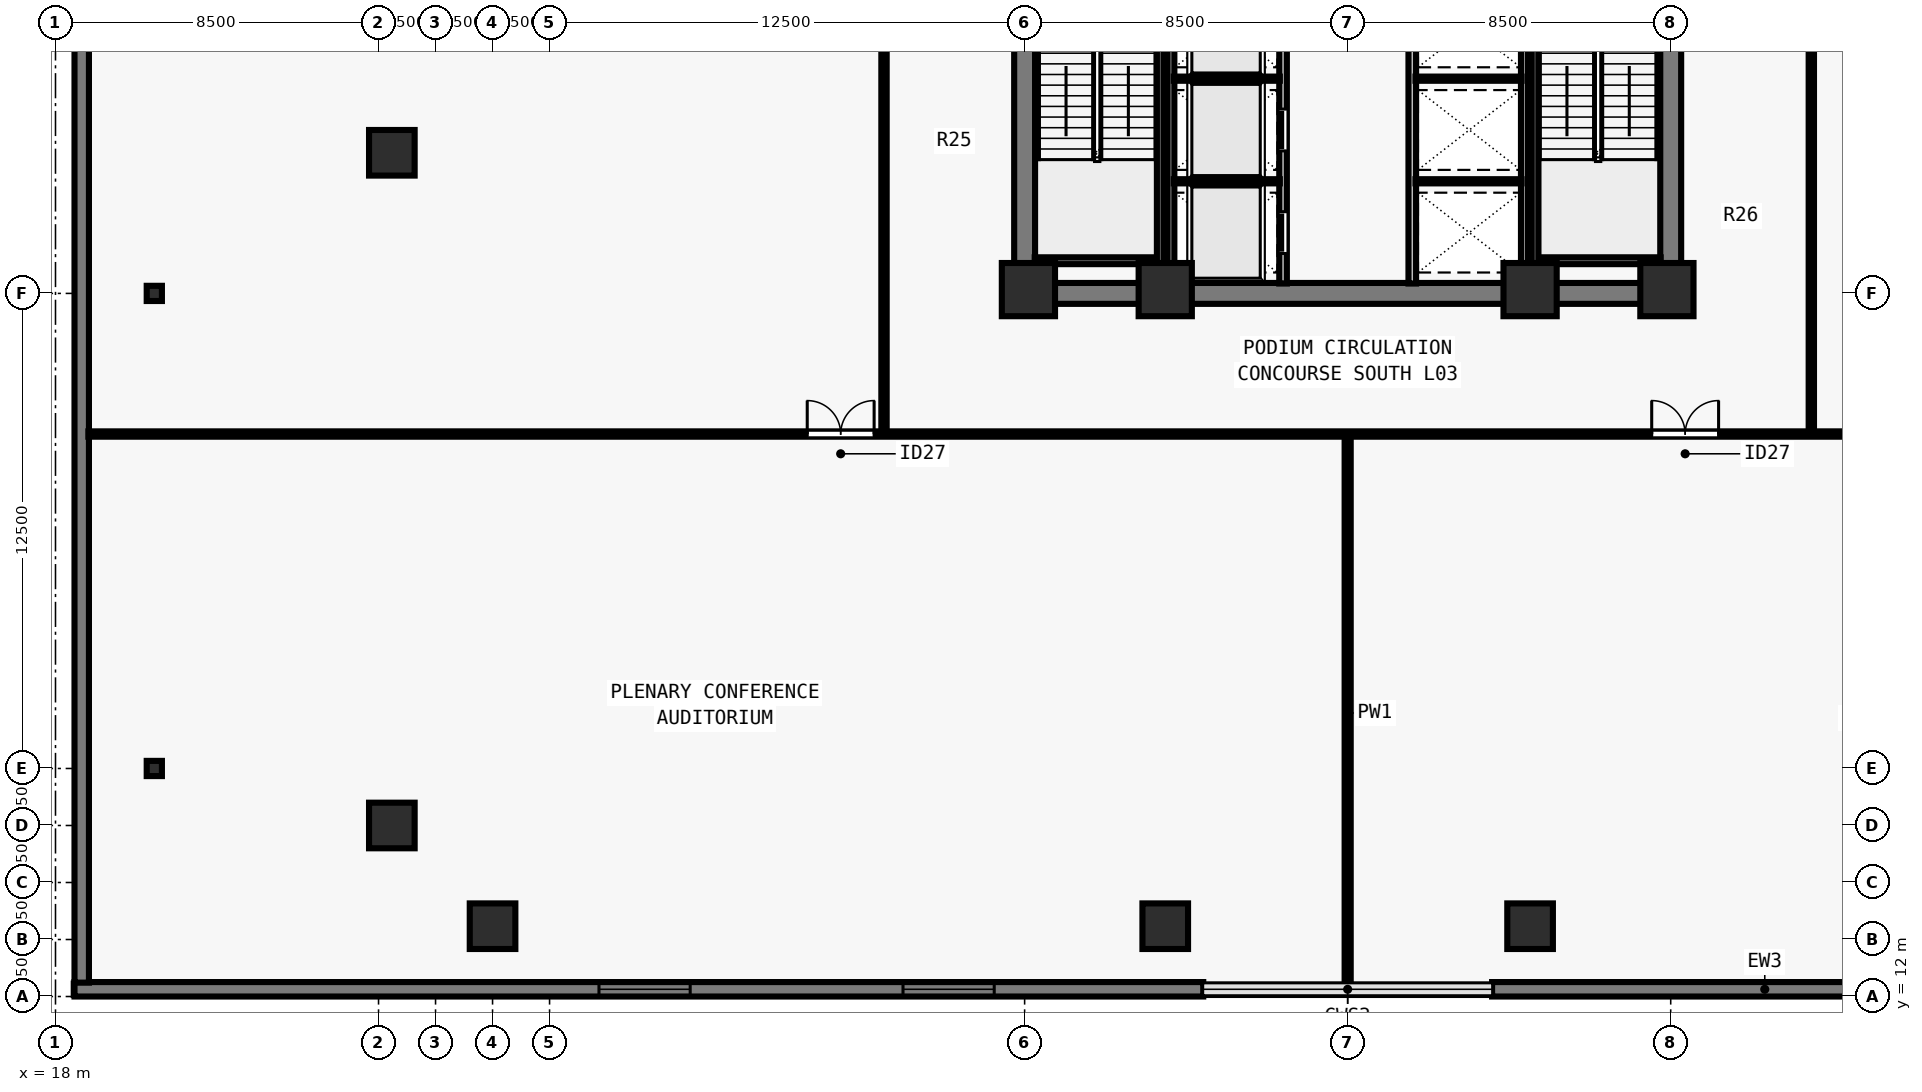
"""IFC4 building model, lengths in metres.
Left out: names, types, materials, properties, quantities, classifications, styles, units other than length and angle.
Written with IfcOpenShell. Run it as: python <this file> out.ifc"""

import sys

from ifc_helpers import new_model, si_unit, direction, frame, frame_2d, origin, origin_2d, place, context, subcontext, project, spatial, rectangle, i_section, extrude, element, fill, save


model = new_model("IFC4")
c1 = context("Model", 3, precision=1e-05, world=origin(), true_north=direction((0.0, 1.0)))
c2 = subcontext(c1, "Body", "Model", "MODEL_VIEW")
j1 = project(units=[si_unit("LENGTHUNIT", "METRE"), si_unit("PLANEANGLEUNIT", "RADIAN")], contexts=[c1])
p1 = place(None, origin())
s1 = spatial("IfcSite", under=j1, at=p1, CompositionType="ELEMENT")
p2 = place(p1, origin())
s2 = spatial("IfcBuilding", under=s1, at=p2, CompositionType="ELEMENT")
p3 = place(p2, frame((0.0, 0.0, 14.5)))
s3 = spatial("IfcBuildingStorey", under=s2, at=p3, CompositionType="ELEMENT", Elevation=14.5)
for number, where, z_axis, x_axis in (
    (1, (43.6, 30.6, 0.0), (0.0, 0.0, 1.0), (1.0, 0.0, 0.0)),
    (2, (47.2, 30.6, 0.0), (0.0, 0.0, 1.0), (1.0, 0.0, 0.0)),
    (3, (56.8, 30.6, 0.0), (0.0, 0.0, 1.0), (1.0, 0.0, 0.0)),
    (4, (60.4, 30.6, 0.0), (0.0, 0.0, 1.0), (1.0, 0.0, 0.0)),
):
    element("IfcColumn", number, at=place(p3, frame(where, z_axis=z_axis, x_axis=x_axis)), inside=s3, PredefinedType="COLUMN", context=c2, shape_type="SweptSolid", body=[
        extrude(rectangle(XDim=1.4, YDim=1.4, at=origin_2d()), origin(), (0.0, 0.0, 1.0), 4.5),
    ])
for number, where, z_axis, x_axis in (
    (5, (29.5, 13.85, 0.0), (0.0, 0.0, 1.0), (1.0, 0.0, 0.0)),
    (6, (47.2, 13.85, 0.0), (0.0, 0.0, 1.0), (1.0, 0.0, 0.0)),
    (7, (56.8, 13.85, 0.0), (0.0, 0.0, 1.0), (1.0, 0.0, 0.0)),
    (8, (26.85, 34.2, 0.0), (0.0, 0.0, 1.0), (1.0, 0.0, 0.0)),
    (9, (26.85, 16.5, 0.0), (0.0, 0.0, 1.0), (1.0, 0.0, 0.0)),
):
    element("IfcColumn", number, at=place(p3, frame(where, z_axis=z_axis, x_axis=x_axis)), inside=s3, PredefinedType="COLUMN", context=c2, shape_type="SweptSolid", body=[
        extrude(rectangle(XDim=1.2, YDim=1.2, at=origin_2d()), origin(), (0.0, 0.0, 1.0), 4.5),
    ])
for number, where, z_axis, x_axis in (
    (10, (20.6, 18.0, 0.0), (0.0, 0.0, 1.0), (1.0, 0.0, 0.0)),
    (11, (20.6, 30.5, 0.0), (0.0, 0.0, 1.0), (1.0, 0.0, 0.0)),
):
    element("IfcColumn", number, at=place(p3, frame(where, z_axis=z_axis, x_axis=x_axis)), inside=s3, PredefinedType="COLUMN", context=c2, shape_type="SweptSolid", body=[
        extrude(i_section(OverallWidth=0.4, OverallDepth=0.4, WebThickness=0.028, FlangeThickness=0.045, at=origin_2d()), origin(), (0.0, 0.0, 1.0), 4.5),
    ])
p4 = place(p3, frame((85.5, 12.19, 0.0), z_axis=(0.0, 0.0, 1.0), x_axis=(-1.0, 0.0, 0.0)))
e12 = element("IfcWall", 12, at=p4, inside=s3, PredefinedType="SOLIDWALL", context=c2, shape_type="SweptSolid", body=[
    extrude(rectangle(XDim=29.7, YDim=0.38, at=frame_2d((14.85, 0.0))), origin(), (0.0, 0.0, 1.0), 4.15),
])
p5 = place(p4, frame((5.5, 0.0, 0.8)))
e13 = element("IfcOpeningElement", 13, at=p5, cuts=e12, PredefinedType="OPENING", context=c2, shape_type="SweptSolid", body=[
    extrude(rectangle(XDim=2.4, YDim=1.6, at=frame_2d((1.2, 0.8))), frame((0.0, 0.2, 0.0), z_axis=(0.0, -1.0, 0.0), x_axis=(1.0, 0.0, 0.0)), (0.0, 0.0, 1.0), 0.4),
])
p6 = place(p4, frame((12.8, 0.0, 0.8)))
e14 = element("IfcOpeningElement", 14, at=p6, cuts=e12, PredefinedType="OPENING", context=c2, shape_type="SweptSolid", body=[
    extrude(rectangle(XDim=2.4, YDim=1.6, at=frame_2d((1.2, 0.8))), frame((0.0, 0.2, 0.0), z_axis=(0.0, -1.0, 0.0), x_axis=(1.0, 0.0, 0.0)), (0.0, 0.0, 1.0), 0.4),
])
p7 = place(p3, frame((48.2, 12.19, 0.0), z_axis=(0.0, 0.0, 1.0), x_axis=(-1.0, 0.0, 0.0)))
e15 = element("IfcWall", 15, at=p7, inside=s3, PredefinedType="SOLIDWALL", context=c2, shape_type="SweptSolid", body=[
    extrude(rectangle(XDim=29.7, YDim=0.38, at=frame_2d((14.85, 0.0))), origin(), (0.0, 0.0, 1.0), 4.15),
])
p8 = place(p7, frame((5.5, 0.0, 0.8)))
e16 = element("IfcOpeningElement", 16, at=p8, cuts=e15, PredefinedType="OPENING", context=c2, shape_type="SweptSolid", body=[
    extrude(rectangle(XDim=2.4, YDim=1.6, at=frame_2d((1.2, 0.8))), frame((0.0, 0.2, 0.0), z_axis=(0.0, -1.0, 0.0), x_axis=(1.0, 0.0, 0.0)), (0.0, 0.0, 1.0), 0.4),
])
p9 = place(p7, frame((13.5, 0.0, 0.8)))
e17 = element("IfcOpeningElement", 17, at=p9, cuts=e15, PredefinedType="OPENING", context=c2, shape_type="SweptSolid", body=[
    extrude(rectangle(XDim=2.4, YDim=1.6, at=frame_2d((1.2, 0.8))), frame((0.0, 0.2, 0.0), z_axis=(0.0, -1.0, 0.0), x_axis=(1.0, 0.0, 0.0)), (0.0, 0.0, 1.0), 0.4),
])
p10 = place(p3, frame((18.69, 12.365, 0.0), z_axis=(0.0, 0.0, 1.0), x_axis=(0.0, 1.0, 0.0)))
e18 = element("IfcWall", 18, at=p10, inside=s3, PredefinedType="SOLIDWALL", context=c2, shape_type="SweptSolid", body=[
    extrude(rectangle(XDim=53.27, YDim=0.38, at=frame_2d((26.635, 0.0))), origin(), (0.0, 0.0, 1.0), 4.15),
])
p11 = place(p3, frame((43.225, 30.5, 0.0), z_axis=(0.0, 0.0, 1.0), x_axis=(1.0, 0.0, 0.0)))
e19 = element("IfcWall", 19, at=p11, inside=s3, PredefinedType="SHEAR", context=c2, shape_type="SweptSolid", body=[
    extrude(rectangle(XDim=17.55, YDim=0.55, at=frame_2d((8.775, 0.0))), origin(), (0.0, 0.0, 1.0), 4.15),
])
for number, where, z_axis, x_axis in (
    (20, (43.5, 30.765, 0.0), (0.0, 0.0, 1.0), (0.0, 1.0, 0.0)),
    (21, (60.5, 30.765, 0.0), (0.0, 0.0, 1.0), (0.0, 1.0, 0.0)),
):
    element("IfcWall", number, at=place(p3, frame(where, z_axis=z_axis, x_axis=x_axis)), inside=s3, PredefinedType="SHEAR", context=c2, shape_type="SweptSolid", body=[
        extrude(rectangle(XDim=7.985, YDim=0.55, at=frame_2d((3.993, 0.0))), origin(), (0.0, 0.0, 1.0), 4.15),
    ])
p12 = place(p3, frame((50.3, 30.76, 0.0), z_axis=(0.0, 0.0, 1.0), x_axis=(0.0, 1.0, 0.0)))
e22 = element("IfcWall", 22, at=p12, inside=s3, PredefinedType="SOLIDWALL", context=c2, shape_type="SweptSolid", body=[
    extrude(rectangle(XDim=7.855, YDim=0.2, at=frame_2d((3.927, 0.0))), origin(), (0.0, 0.0, 1.0), 4.15),
])
p13 = place(p12, frame((0.79, 0.0, 0.0)))
e23 = element("IfcOpeningElement", 23, at=p13, cuts=e22, PredefinedType="OPENING", context=c2, shape_type="SweptSolid", body=[
    extrude(rectangle(XDim=1.1, YDim=2.2, at=frame_2d((0.55, 1.1))), frame((0.0, 0.11, 0.0), z_axis=(0.0, -1.0, 0.0), x_axis=(1.0, 0.0, 0.0)), (0.0, 0.0, 1.0), 0.22),
])
p14 = place(p12, frame((3.49, 0.0, 0.0)))
e24 = element("IfcOpeningElement", 24, at=p14, cuts=e22, PredefinedType="OPENING", context=c2, shape_type="SweptSolid", body=[
    extrude(rectangle(XDim=1.1, YDim=2.2, at=frame_2d((0.55, 1.1))), frame((0.0, 0.11, 0.0), z_axis=(0.0, -1.0, 0.0), x_axis=(1.0, 0.0, 0.0)), (0.0, 0.0, 1.0), 0.22),
])
p15 = place(p12, frame((6.19, 0.0, 0.0)))
e25 = element("IfcOpeningElement", 25, at=p15, cuts=e22, PredefinedType="OPENING", context=c2, shape_type="SweptSolid", body=[
    extrude(rectangle(XDim=1.1, YDim=2.2, at=frame_2d((0.55, 1.1))), frame((0.0, 0.11, 0.0), z_axis=(0.0, -1.0, 0.0), x_axis=(1.0, 0.0, 0.0)), (0.0, 0.0, 1.0), 0.22),
])
p16 = place(p3, frame((53.7, 30.76, 0.0), z_axis=(0.0, 0.0, 1.0), x_axis=(0.0, 1.0, 0.0)))
e26 = element("IfcWall", 26, at=p16, inside=s3, PredefinedType="SOLIDWALL", context=c2, shape_type="SweptSolid", body=[
    extrude(rectangle(XDim=7.855, YDim=0.2, at=frame_2d((3.927, 0.0))), origin(), (0.0, 0.0, 1.0), 4.15),
])
p17 = place(p3, frame((47.35, 30.76, 0.0), z_axis=(0.0, 0.0, 1.0), x_axis=(0.0, 1.0, 0.0)))
e27 = element("IfcWall", 27, at=p17, inside=s3, PredefinedType="SOLIDWALL", context=c2, shape_type="SweptSolid", body=[
    extrude(rectangle(XDim=7.855, YDim=0.18, at=frame_2d((3.927, 0.0))), origin(), (0.0, 0.0, 1.0), 4.15),
])
for number, where, z_axis, x_axis in (
    (28, (47.425, 33.45, 0.0), (0.0, 0.0, 1.0), (1.0, 0.0, 0.0)),
    (29, (47.425, 36.15, 0.0), (0.0, 0.0, 1.0), (1.0, 0.0, 0.0)),
):
    element("IfcWall", number, at=place(p3, frame(where, z_axis=z_axis, x_axis=x_axis)), inside=s3, PredefinedType="PARTITIONING", context=c2, shape_type="SweptSolid", body=[
        extrude(rectangle(XDim=2.79, YDim=0.11, at=frame_2d((1.395, 0.0))), origin(), (0.0, 0.0, 1.0), 4.15),
    ])
p18 = place(p3, frame((56.65, 30.76, 0.0), z_axis=(0.0, 0.0, 1.0), x_axis=(0.0, 1.0, 0.0)))
e30 = element("IfcWall", 30, at=p18, inside=s3, PredefinedType="SOLIDWALL", context=c2, shape_type="SweptSolid", body=[
    extrude(rectangle(XDim=7.855, YDim=0.18, at=frame_2d((3.927, 0.0))), origin(), (0.0, 0.0, 1.0), 4.15),
])
for number, where, z_axis, x_axis in (
    (31, (53.785, 33.45, 0.0), (0.0, 0.0, 1.0), (1.0, 0.0, 0.0)),
    (32, (53.785, 36.15, 0.0), (0.0, 0.0, 1.0), (1.0, 0.0, 0.0)),
):
    element("IfcWall", number, at=place(p3, frame(where, z_axis=z_axis, x_axis=x_axis)), inside=s3, PredefinedType="PARTITIONING", context=c2, shape_type="SweptSolid", body=[
        extrude(rectangle(XDim=2.79, YDim=0.11, at=frame_2d((1.395, 0.0))), origin(), (0.0, 0.0, 1.0), 4.15),
    ])
p19 = place(p3, frame((18.865, 26.8, 0.0), z_axis=(0.0, 0.0, 1.0), x_axis=(1.0, 0.0, 0.0)))
e33 = element("IfcWall", 33, at=p19, inside=s3, PredefinedType="PARTITIONING", context=c2, shape_type="SweptSolid", body=[
    extrude(rectangle(XDim=66.27, YDim=0.14, at=frame_2d((33.135, 0.0))), origin(), (0.0, 0.0, 1.0), 3.668),
])
p20 = place(p19, frame((18.915, 0.0, 0.0)))
e34 = element("IfcOpeningElement", 34, at=p20, cuts=e33, PredefinedType="OPENING", context=c2, shape_type="SweptSolid", body=[
    extrude(rectangle(XDim=1.76, YDim=2.2, at=frame_2d((0.88, 1.1))), frame((0.0, 0.08, 0.0), z_axis=(0.0, -1.0, 0.0), x_axis=(1.0, 0.0, 0.0)), (0.0, 0.0, 1.0), 0.16),
])
p21 = place(p19, frame((41.135, 0.0, 0.0)))
e35 = element("IfcOpeningElement", 35, at=p21, cuts=e33, PredefinedType="OPENING", context=c2, shape_type="SweptSolid", body=[
    extrude(rectangle(XDim=1.76, YDim=2.2, at=frame_2d((0.88, 1.1))), frame((0.0, 0.08, 0.0), z_axis=(0.0, -1.0, 0.0), x_axis=(1.0, 0.0, 0.0)), (0.0, 0.0, 1.0), 0.16),
])
p22 = place(p3, frame((39.8, 26.855, 0.0), z_axis=(0.0, 0.0, 1.0), x_axis=(0.0, 1.0, 0.0)))
e36 = element("IfcWall", 36, at=p22, inside=s3, PredefinedType="PARTITIONING", context=c2, shape_type="SweptSolid", body=[
    extrude(rectangle(XDim=24.29, YDim=0.14, at=frame_2d((12.145, 0.0))), origin(), (0.0, 0.0, 1.0), 4.15),
])
p23 = place(p22, frame((10.945, 0.0, 0.0)))
e37 = element("IfcOpeningElement", 37, at=p23, cuts=e36, PredefinedType="OPENING", context=c2, shape_type="SweptSolid", body=[
    extrude(rectangle(XDim=1.76, YDim=2.2, at=frame_2d((0.88, 1.1))), frame((0.0, 0.08, 0.0), z_axis=(0.0, -1.0, 0.0), x_axis=(1.0, 0.0, 0.0)), (0.0, 0.0, 1.0), 0.16),
])
p24 = place(p3, frame((64.2, 26.855, 0.0), z_axis=(0.0, 0.0, 1.0), x_axis=(0.0, 1.0, 0.0)))
e38 = element("IfcWall", 38, at=p24, inside=s3, PredefinedType="PARTITIONING", context=c2, shape_type="SweptSolid", body=[
    extrude(rectangle(XDim=24.29, YDim=0.14, at=frame_2d((12.145, 0.0))), origin(), (0.0, 0.0, 1.0), 4.15),
])
p25 = place(p24, frame((10.945, 0.0, 0.0)))
e39 = element("IfcOpeningElement", 39, at=p25, cuts=e38, PredefinedType="OPENING", context=c2, shape_type="SweptSolid", body=[
    extrude(rectangle(XDim=1.76, YDim=2.2, at=frame_2d((0.88, 1.1))), frame((0.0, 0.08, 0.0), z_axis=(0.0, -1.0, 0.0), x_axis=(1.0, 0.0, 0.0)), (0.0, 0.0, 1.0), 0.16),
])
p26 = place(p3, frame((52.0, 12.22, 0.0), z_axis=(0.0, 0.0, 1.0), x_axis=(0.0, 1.0, 0.0)))
e40 = element("IfcWall", 40, at=p26, inside=s3, PredefinedType="PARTITIONING", context=c2, shape_type="SweptSolid", body=[
    extrude(rectangle(XDim=14.48, YDim=0.16, at=frame_2d((7.24, 0.0))), origin(), (0.0, 0.0, 1.0), 4.15),
])
p27 = place(p3, frame((43.765, 31.36, 0.0), z_axis=(0.0, 0.0, 1.0), x_axis=(1.0, 0.0, 0.0)))
e41 = element("IfcWall", 41, at=p27, inside=s3, PredefinedType="SOLIDWALL", context=c2, shape_type="SweptSolid", body=[
    extrude(rectangle(XDim=3.23, YDim=0.18, at=frame_2d((1.615, 0.0))), origin(), (0.0, 0.0, 1.0), 4.15),
])
p28 = place(p3, frame((47.07, 38.78, 0.0), z_axis=(0.0, 0.0, 1.0), x_axis=(0.0, -1.0, 0.0)))
e42 = element("IfcWall", 42, at=p28, inside=s3, PredefinedType="SOLIDWALL", context=c2, shape_type="SweptSolid", body=[
    extrude(rectangle(XDim=8.017, YDim=0.18, at=frame_2d((4.009, 0.0))), origin(), (0.0, 0.0, 1.0), 4.15),
])
p29 = place(p3, frame((57.005, 31.36, 0.0), z_axis=(0.0, 0.0, 1.0), x_axis=(1.0, 0.0, 0.0)))
e43 = element("IfcWall", 43, at=p29, inside=s3, PredefinedType="SOLIDWALL", context=c2, shape_type="SweptSolid", body=[
    extrude(rectangle(XDim=3.23, YDim=0.18, at=frame_2d((1.615, 0.0))), origin(), (0.0, 0.0, 1.0), 4.15),
])
p30 = place(p3, frame((56.93, 38.78, 0.0), z_axis=(0.0, 0.0, 1.0), x_axis=(0.0, -1.0, 0.0)))
e44 = element("IfcWall", 44, at=p30, inside=s3, PredefinedType="SOLIDWALL", context=c2, shape_type="SweptSolid", body=[
    extrude(rectangle(XDim=8.017, YDim=0.18, at=frame_2d((4.009, 0.0))), origin(), (0.0, 0.0, 1.0), 4.15),
])
p31 = place(p8, origin())
e45 = element("IfcWindow", 45, at=p31, inside=s3, PartitioningType="SINGLE_PANEL", PredefinedType="WINDOW", context=c2, shape_type="SweptSolid", body=[
    extrude(rectangle(XDim=2.4, YDim=1.6, at=frame_2d((1.2, 0.8))), frame((0.0, -0.05, 0.0), z_axis=(0.0, -1.0, 0.0), x_axis=(1.0, 0.0, 0.0)), (0.0, 0.0, 1.0), 0.06),
])
fill(e16, e45)
p32 = place(p9, origin())
e46 = element("IfcWindow", 46, at=p32, inside=s3, PartitioningType="SINGLE_PANEL", PredefinedType="WINDOW", context=c2, shape_type="SweptSolid", body=[
    extrude(rectangle(XDim=2.4, YDim=1.6, at=frame_2d((1.2, 0.8))), frame((0.0, -0.05, 0.0), z_axis=(0.0, -1.0, 0.0), x_axis=(1.0, 0.0, 0.0)), (0.0, 0.0, 1.0), 0.06),
])
fill(e17, e46)
p33 = place(p13, origin())
e47 = element("IfcDoor", 47, at=p33, inside=s3, OperationType="SLIDING_TO_LEFT", PredefinedType="DOOR", context=c2, shape_type="SweptSolid", body=[
    extrude(rectangle(XDim=1.1, YDim=2.2, at=frame_2d((0.55, 1.1))), frame((0.0, 0.025, 0.0), z_axis=(0.0, -1.0, 0.0), x_axis=(1.0, 0.0, 0.0)), (0.0, 0.0, 1.0), 0.05),
])
fill(e23, e47)
p34 = place(p14, origin())
e48 = element("IfcDoor", 48, at=p34, inside=s3, OperationType="SLIDING_TO_LEFT", PredefinedType="DOOR", context=c2, shape_type="SweptSolid", body=[
    extrude(rectangle(XDim=1.1, YDim=2.2, at=frame_2d((0.55, 1.1))), frame((0.0, 0.025, 0.0), z_axis=(0.0, -1.0, 0.0), x_axis=(1.0, 0.0, 0.0)), (0.0, 0.0, 1.0), 0.05),
])
fill(e24, e48)
p35 = place(p20, origin())
e49 = element("IfcDoor", 49, at=p35, inside=s3, OperationType="DOUBLE_DOOR_SINGLE_SWING", PredefinedType="DOOR", context=c2, shape_type="SweptSolid", body=[
    extrude(rectangle(XDim=1.76, YDim=2.2, at=frame_2d((0.88, 1.1))), frame((0.0, 0.025, 0.0), z_axis=(0.0, -1.0, 0.0), x_axis=(1.0, 0.0, 0.0)), (0.0, 0.0, 1.0), 0.05),
])
fill(e34, e49)
p36 = place(p21, origin())
e50 = element("IfcDoor", 50, at=p36, inside=s3, OperationType="DOUBLE_DOOR_SINGLE_SWING", PredefinedType="DOOR", context=c2, shape_type="SweptSolid", body=[
    extrude(rectangle(XDim=1.76, YDim=2.2, at=frame_2d((0.88, 1.1))), frame((0.0, 0.025, 0.0), z_axis=(0.0, -1.0, 0.0), x_axis=(1.0, 0.0, 0.0)), (0.0, 0.0, 1.0), 0.05),
])
fill(e35, e50)
save(model, sys.argv[1])
